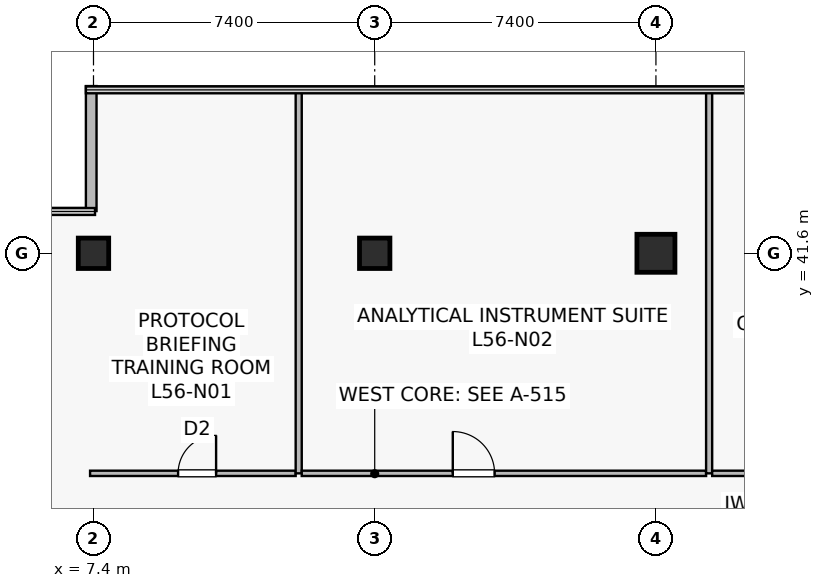
"""IFC4 building model, lengths in metres.
Left out: names, types, materials, properties, quantities, classifications, styles, units other than length and angle.
Written with IfcOpenShell. Run it as: python <this file> out.ifc"""

import sys

from ifc_helpers import new_model, si_unit, direction, frame, frame_2d, origin, origin_2d, place, context, subcontext, project, spatial, rectangle, extrude, source, transform, mapped, element, fill, save


model = new_model("IFC4")
c1 = context("Model", 3, precision=1e-05, world=origin(), true_north=direction((0.0, 1.0)))
c2 = subcontext(c1, "Body", "Model", "MODEL_VIEW")
j1 = project(units=[si_unit("LENGTHUNIT", "METRE"), si_unit("PLANEANGLEUNIT", "RADIAN")], contexts=[c1])
p1 = place(None, origin())
s1 = spatial("IfcSite", under=j1, at=p1, CompositionType="ELEMENT")
p2 = place(p1, origin())
s2 = spatial("IfcBuilding", under=s1, at=p2, CompositionType="ELEMENT")
p3 = place(p2, frame((0.0, 0.0, 234.2)))
s3 = spatial("IfcBuildingStorey", under=s2, at=p3, CompositionType="ELEMENT", Elevation=234.2)
m1 = source(origin(), c2, "Body", "SweptSolid", [
    extrude(rectangle(XDim=0.8, YDim=0.8, at=origin_2d()), origin(), (0.0, 0.0, 1.0), 4.1),
])
p4 = place(p3, frame((14.8, 41.6, 0.0), z_axis=(0.0, 0.0, 1.0), x_axis=(1.0, 0.0, 0.0)))
e1 = element("IfcColumn", 1, at=p4, inside=s3, PredefinedType="COLUMN", context=c2, shape_type="MappedRepresentation", body=[
    mapped(m1, transform((0.0, 0.0, 0.0), scale=1.0)),
])
m2 = source(origin(), c2, "Body", "SweptSolid", [
    extrude(rectangle(XDim=1.0, YDim=1.0, at=origin_2d()), origin(), (0.0, 0.0, 1.0), 4.1),
])
p5 = place(p3, frame((22.2, 41.6, 0.0), z_axis=(0.0, 0.0, 1.0), x_axis=(1.0, 0.0, 0.0)))
e2 = element("IfcColumn", 2, at=p5, inside=s3, PredefinedType="COLUMN", context=c2, shape_type="MappedRepresentation", body=[
    mapped(m2, transform((0.0, 0.0, 0.0), scale=1.0)),
])
p6 = place(p3, frame((7.4, 41.6, 0.0), z_axis=(0.0, 0.0, 1.0), x_axis=(1.0, 0.0, 0.0)))
e3 = element("IfcColumn", 3, at=p6, inside=s3, PredefinedType="COLUMN", context=c2, shape_type="MappedRepresentation", body=[
    mapped(m1, transform((0.0, 0.0, 0.0), scale=1.0)),
])
p7 = place(p3, frame((7.34, 46.0, 0.0), z_axis=(0.0, 0.0, 1.0), x_axis=(0.0, -1.0, 0.0)))
e4 = element("IfcWall", 4, at=p7, inside=s3, PredefinedType="STANDARD", context=c2, shape_type="SweptSolid", body=[
    extrude(rectangle(XDim=3.288, YDim=0.28, at=frame_2d((1.644, 0.0))), origin(), (0.0, 0.0, 1.0), 3.8),
])
p8 = place(p3, frame((7.31, 35.81, 0.0), z_axis=(0.0, 0.0, 1.0), x_axis=(1.0, 0.0, 0.0)))
e5 = element("IfcWall", 5, at=p8, inside=s3, PredefinedType="PARTITIONING", context=c2, shape_type="SweptSolid", body=[
    extrude(rectangle(XDim=5.41, YDim=0.14, at=frame_2d((2.705, 0.0))), origin(), (0.0, 0.0, 1.0), 3.335),
])
p9 = place(p8, frame((2.316, 0.0, 0.0)))
e6 = element("IfcOpeningElement", 6, at=p9, cuts=e5, PredefinedType="OPENING", context=c2, shape_type="SweptSolid", body=[
    extrude(rectangle(XDim=1.0, YDim=2.15, at=frame_2d((0.5, 1.075))), frame((0.0, 0.08, 0.0), z_axis=(0.0, -1.0, 0.0), x_axis=(1.0, 0.0, 0.0)), (0.0, 0.0, 1.0), 0.16),
])
p10 = place(p3, frame((12.8, 35.81, 0.0), z_axis=(0.0, 0.0, 1.0), x_axis=(0.0, 1.0, 0.0)))
e7 = element("IfcWall", 7, at=p10, inside=s3, PredefinedType="PARTITIONING", context=c2, shape_type="SweptSolid", body=[
    extrude(rectangle(XDim=10.08, YDim=0.16, at=frame_2d((5.04, 0.0))), origin(), (0.0, 0.0, 1.0), 3.135),
])
p11 = place(p3, frame((12.88, 35.81, 0.0), z_axis=(0.0, 0.0, 1.0), x_axis=(1.0, 0.0, 0.0)))
e8 = element("IfcWall", 8, at=p11, inside=s3, PredefinedType="PARTITIONING", context=c2, shape_type="SweptSolid", body=[
    extrude(rectangle(XDim=10.64, YDim=0.14, at=frame_2d((5.32, 0.0))), origin(), (0.0, 0.0, 1.0), 3.197),
])
p12 = place(p11, frame((3.974, 0.0, 0.0)))
e9 = element("IfcOpeningElement", 9, at=p12, cuts=e8, PredefinedType="OPENING", context=c2, shape_type="SweptSolid", body=[
    extrude(rectangle(XDim=1.1, YDim=2.18, at=frame_2d((0.55, 1.09))), frame((0.0, 0.08, 0.0), z_axis=(0.0, -1.0, 0.0), x_axis=(1.0, 0.0, 0.0)), (0.0, 0.0, 1.0), 0.16),
])
p13 = place(p3, frame((23.6, 35.81, 0.0), z_axis=(0.0, 0.0, 1.0), x_axis=(0.0, 1.0, 0.0)))
e10 = element("IfcWall", 10, at=p13, inside=s3, PredefinedType="PARTITIONING", context=c2, shape_type="SweptSolid", body=[
    extrude(rectangle(XDim=10.08, YDim=0.16, at=frame_2d((5.04, 0.0))), origin(), (0.0, 0.0, 1.0), 3.135),
])
p14 = place(p3, frame((23.68, 35.81, 0.0), z_axis=(0.0, 0.0, 1.0), x_axis=(1.0, 0.0, 0.0)))
e11 = element("IfcWall", 11, at=p14, inside=s3, PredefinedType="PARTITIONING", context=c2, shape_type="SweptSolid", body=[
    extrude(rectangle(XDim=12.04, YDim=0.14, at=frame_2d((6.02, 0.0))), origin(), (0.0, 0.0, 1.0), 3.197),
])
p15 = place(p14, frame((5.777, 0.0, 0.0)))
e12 = element("IfcOpeningElement", 12, at=p15, cuts=e11, PredefinedType="OPENING", context=c2, shape_type="SweptSolid", body=[
    extrude(rectangle(XDim=1.1, YDim=2.18, at=frame_2d((0.55, 1.09))), frame((0.0, 0.08, 0.0), z_axis=(0.0, -1.0, 0.0), x_axis=(1.0, 0.0, 0.0)), (0.0, 0.0, 1.0), 0.16),
])
m3 = source(origin(), c2, "Body", "SweptSolid", [
    extrude(rectangle(XDim=1.0, YDim=2.15, at=frame_2d((0.5, 1.075))), frame((0.0, 0.025, 0.0), z_axis=(0.0, -1.0, 0.0), x_axis=(1.0, 0.0, 0.0)), (0.0, 0.0, 1.0), 0.05),
])
p16 = place(p9, origin())
e13 = element("IfcDoor", 13, at=p16, inside=s3, OperationType="SINGLE_SWING_RIGHT", PredefinedType="DOOR", context=c2, shape_type="MappedRepresentation", body=[
    mapped(m3, transform((0.0, 0.0, 0.0), scale=1.0)),
])
fill(e6, e13)
m4 = source(origin(), c2, "Body", "SweptSolid", [
    extrude(rectangle(XDim=1.1, YDim=2.18, at=frame_2d((0.55, 1.09))), frame((0.0, 0.025, 0.0), z_axis=(0.0, -1.0, 0.0), x_axis=(1.0, 0.0, 0.0)), (0.0, 0.0, 1.0), 0.05),
])
p17 = place(p12, origin())
e14 = element("IfcDoor", 14, at=p17, inside=s3, OperationType="SINGLE_SWING_LEFT", PredefinedType="DOOR", context=c2, shape_type="MappedRepresentation", body=[
    mapped(m4, transform((0.0, 0.0, 0.0), scale=1.0)),
])
fill(e9, e14)
save(model, sys.argv[1])
